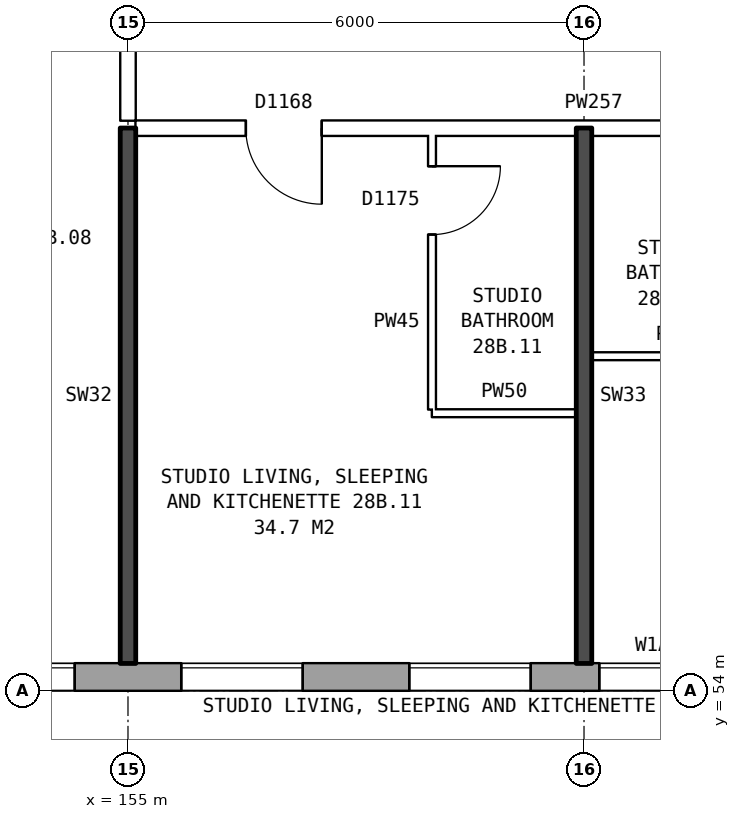
"""IFC4 building model, lengths in metres.
Left out: names, types, materials, properties, quantities, classifications, styles, units other than length and angle.
Written with IfcOpenShell. Run it as: python <this file> out.ifc"""

import sys

from ifc_helpers import new_model, si_unit, direction, frame, frame_2d, origin, place, context, subcontext, project, spatial, rectangle, extrude, element, fill, save


model = new_model("IFC4")
c1 = context("Model", 3, precision=1e-05, world=origin(), true_north=direction((0.0, 1.0)))
c2 = subcontext(c1, "Body", "Model", "MODEL_VIEW")
j1 = project(units=[si_unit("LENGTHUNIT", "METRE"), si_unit("PLANEANGLEUNIT", "RADIAN")], contexts=[c1])
p1 = place(None, origin())
s1 = spatial("IfcSite", under=j1, at=p1, CompositionType="ELEMENT")
p2 = place(p1, origin())
s2 = spatial("IfcBuilding", under=s1, at=p2, CompositionType="ELEMENT")
p3 = place(p2, frame((0.0, 0.0, 102.6)))
s3 = spatial("IfcBuildingStorey", under=s2, at=p3, CompositionType="ELEMENT", Elevation=102.6)
p4 = place(p3, frame((134.075, 54.18, 0.0), z_axis=(0.0, 0.0, 1.0), x_axis=(1.0, 0.0, 0.0)))
e1 = element("IfcWall", 1, at=p4, inside=s3, PredefinedType="STANDARD", context=c2, shape_type="SweptSolid", body=[
    extrude(rectangle(XDim=36.851, YDim=0.36, at=frame_2d((18.425, 0.0))), origin(), (0.0, 0.0, 1.0), 2.85),
])
p5 = place(p4, frame((0.625, 0.0, 0.8)))
e2 = element("IfcOpeningElement", 2, at=p5, cuts=e1, PredefinedType="OPENING", context=c2, shape_type="SweptSolid", body=[
    extrude(rectangle(XDim=1.6, YDim=1.8, at=frame_2d((0.8, 0.9))), frame((0.0, 0.19, 0.0), z_axis=(0.0, -1.0, 0.0), x_axis=(1.0, 0.0, 0.0)), (0.0, 0.0, 1.0), 0.38),
])
p6 = place(p4, frame((3.625, 0.0, 0.8)))
e3 = element("IfcOpeningElement", 3, at=p6, cuts=e1, PredefinedType="OPENING", context=c2, shape_type="SweptSolid", body=[
    extrude(rectangle(XDim=1.6, YDim=1.8, at=frame_2d((0.8, 0.9))), frame((0.0, 0.19, 0.0), z_axis=(0.0, -1.0, 0.0), x_axis=(1.0, 0.0, 0.0)), (0.0, 0.0, 1.0), 0.38),
])
p7 = place(p4, frame((7.475, 0.0, 0.8)))
e4 = element("IfcOpeningElement", 4, at=p7, cuts=e1, PredefinedType="OPENING", context=c2, shape_type="SweptSolid", body=[
    extrude(rectangle(XDim=1.2, YDim=1.2, at=frame_2d((0.6, 0.6))), frame((0.0, 0.19, 0.0), z_axis=(0.0, -1.0, 0.0), x_axis=(1.0, 0.0, 0.0)), (0.0, 0.0, 1.0), 0.38),
])
p8 = place(p4, frame((9.625, 0.0, 0.8)))
e5 = element("IfcOpeningElement", 5, at=p8, cuts=e1, PredefinedType="OPENING", context=c2, shape_type="SweptSolid", body=[
    extrude(rectangle(XDim=1.6, YDim=1.8, at=frame_2d((0.8, 0.9))), frame((0.0, 0.19, 0.0), z_axis=(0.0, -1.0, 0.0), x_axis=(1.0, 0.0, 0.0)), (0.0, 0.0, 1.0), 0.38),
])
p9 = place(p4, frame((12.625, 0.0, 0.8)))
e6 = element("IfcOpeningElement", 6, at=p9, cuts=e1, PredefinedType="OPENING", context=c2, shape_type="SweptSolid", body=[
    extrude(rectangle(XDim=1.6, YDim=1.8, at=frame_2d((0.8, 0.9))), frame((0.0, 0.19, 0.0), z_axis=(0.0, -1.0, 0.0), x_axis=(1.0, 0.0, 0.0)), (0.0, 0.0, 1.0), 0.38),
])
p10 = place(p4, frame((15.625, 0.0, 0.8)))
e7 = element("IfcOpeningElement", 7, at=p10, cuts=e1, PredefinedType="OPENING", context=c2, shape_type="SweptSolid", body=[
    extrude(rectangle(XDim=1.6, YDim=1.8, at=frame_2d((0.8, 0.9))), frame((0.0, 0.19, 0.0), z_axis=(0.0, -1.0, 0.0), x_axis=(1.0, 0.0, 0.0)), (0.0, 0.0, 1.0), 0.38),
])
p11 = place(p4, frame((18.625, 0.0, 0.8)))
e8 = element("IfcOpeningElement", 8, at=p11, cuts=e1, PredefinedType="OPENING", context=c2, shape_type="SweptSolid", body=[
    extrude(rectangle(XDim=1.6, YDim=1.8, at=frame_2d((0.8, 0.9))), frame((0.0, 0.19, 0.0), z_axis=(0.0, -1.0, 0.0), x_axis=(1.0, 0.0, 0.0)), (0.0, 0.0, 1.0), 0.38),
])
p12 = place(p4, frame((21.625, 0.0, 0.8)))
e9 = element("IfcOpeningElement", 9, at=p12, cuts=e1, PredefinedType="OPENING", context=c2, shape_type="SweptSolid", body=[
    extrude(rectangle(XDim=1.6, YDim=1.8, at=frame_2d((0.8, 0.9))), frame((0.0, 0.19, 0.0), z_axis=(0.0, -1.0, 0.0), x_axis=(1.0, 0.0, 0.0)), (0.0, 0.0, 1.0), 0.38),
])
p13 = place(p4, frame((24.625, 0.0, 0.8)))
e10 = element("IfcOpeningElement", 10, at=p13, cuts=e1, PredefinedType="OPENING", context=c2, shape_type="SweptSolid", body=[
    extrude(rectangle(XDim=1.6, YDim=1.8, at=frame_2d((0.8, 0.9))), frame((0.0, 0.19, 0.0), z_axis=(0.0, -1.0, 0.0), x_axis=(1.0, 0.0, 0.0)), (0.0, 0.0, 1.0), 0.38),
])
p14 = place(p4, frame((27.125, 0.0, 0.8)))
e11 = element("IfcOpeningElement", 11, at=p14, cuts=e1, PredefinedType="OPENING", context=c2, shape_type="SweptSolid", body=[
    extrude(rectangle(XDim=1.4, YDim=1.8, at=frame_2d((0.7, 0.9))), frame((0.0, 0.19, 0.0), z_axis=(0.0, -1.0, 0.0), x_axis=(1.0, 0.0, 0.0)), (0.0, 0.0, 1.0), 0.38),
])
p15 = place(p4, frame((28.825, 0.0, 0.8)))
e12 = element("IfcOpeningElement", 12, at=p15, cuts=e1, PredefinedType="OPENING", context=c2, shape_type="SweptSolid", body=[
    extrude(rectangle(XDim=0.8, YDim=0.9, at=frame_2d((0.4, 0.45))), frame((0.0, 0.19, 0.0), z_axis=(0.0, -1.0, 0.0), x_axis=(1.0, 0.0, 0.0)), (0.0, 0.0, 1.0), 0.38),
])
p16 = place(p4, frame((33.625, 0.0, 0.8)))
e13 = element("IfcOpeningElement", 13, at=p16, cuts=e1, PredefinedType="OPENING", context=c2, shape_type="SweptSolid", body=[
    extrude(rectangle(XDim=1.6, YDim=1.8, at=frame_2d((0.8, 0.9))), frame((0.0, 0.19, 0.0), z_axis=(0.0, -1.0, 0.0), x_axis=(1.0, 0.0, 0.0)), (0.0, 0.0, 1.0), 0.38),
])
p17 = place(p4, frame((30.825, 0.0, 1.7)))
e14 = element("IfcOpeningElement", 14, at=p17, cuts=e1, PredefinedType="OPENING", context=c2, shape_type="SweptSolid", body=[
    extrude(rectangle(XDim=0.8, YDim=0.9, at=frame_2d((0.4, 0.45))), frame((0.0, 0.19, 0.0), z_axis=(0.0, -1.0, 0.0), x_axis=(1.0, 0.0, 0.0)), (0.0, 0.0, 1.0), 0.38),
])
p18 = place(p4, frame((31.925, 0.0, 0.8)))
e15 = element("IfcOpeningElement", 15, at=p18, cuts=e1, PredefinedType="OPENING", context=c2, shape_type="SweptSolid", body=[
    extrude(rectangle(XDim=0.8, YDim=1.8, at=frame_2d((0.4, 0.9))), frame((0.0, 0.19, 0.0), z_axis=(0.0, -1.0, 0.0), x_axis=(1.0, 0.0, 0.0)), (0.0, 0.0, 1.0), 0.38),
])
p19 = place(p3, frame((159.0, 57.65, 0.0), z_axis=(0.0, 0.0, 1.0), x_axis=(1.0, 0.0, 0.0)))
e16 = element("IfcWall", 16, at=p19, inside=s3, PredefinedType="PARTITIONING", context=c2, shape_type="SweptSolid", body=[
    extrude(rectangle(XDim=1.9, YDim=0.1, at=frame_2d((0.95, 0.0))), origin(), (0.0, 0.0, 1.0), 2.85),
])
p20 = place(p3, frame((161.1, 58.4, 0.0), z_axis=(0.0, 0.0, 1.0), x_axis=(1.0, 0.0, 0.0)))
e17 = element("IfcWall", 17, at=p20, inside=s3, PredefinedType="PARTITIONING", context=c2, shape_type="SweptSolid", body=[
    extrude(rectangle(XDim=2.3, YDim=0.1, at=frame_2d((1.15, 0.0))), origin(), (0.0, 0.0, 1.0), 2.85),
])
p21 = place(p3, frame((155.1, 61.4, 0.0), z_axis=(0.0, 0.0, 1.0), x_axis=(1.0, 0.0, 0.0)))
e18 = element("IfcWall", 18, at=p21, inside=s3, PredefinedType="PARTITIONING", context=c2, shape_type="SweptSolid", body=[
    extrude(rectangle(XDim=18.54, YDim=0.2, at=frame_2d((9.27, 0.0))), origin(), (0.0, 0.0, 1.0), 2.85),
])
p22 = place(p21, frame((1.45, 0.0, 0.0)))
e19 = element("IfcOpeningElement", 19, at=p22, cuts=e18, PredefinedType="OPENING", context=c2, shape_type="SweptSolid", body=[
    extrude(rectangle(XDim=1.0, YDim=2.1, at=frame_2d((0.5, 1.05))), frame((0.0, 0.11, 0.0), z_axis=(0.0, -1.0, 0.0), x_axis=(1.0, 0.0, 0.0)), (0.0, 0.0, 1.0), 0.22),
])
p23 = place(p21, frame((9.6, 0.0, 0.0)))
e20 = element("IfcOpeningElement", 20, at=p23, cuts=e18, PredefinedType="OPENING", context=c2, shape_type="SweptSolid", body=[
    extrude(rectangle(XDim=1.0, YDim=2.1, at=frame_2d((0.5, 1.05))), frame((0.0, 0.11, 0.0), z_axis=(0.0, -1.0, 0.0), x_axis=(1.0, 0.0, 0.0)), (0.0, 0.0, 1.0), 0.22),
])
p24 = place(p21, frame((15.92, 0.0, 0.0)))
e21 = element("IfcOpeningElement", 21, at=p24, cuts=e18, PredefinedType="OPENING", context=c2, shape_type="SweptSolid", body=[
    extrude(rectangle(XDim=1.0, YDim=2.1, at=frame_2d((0.5, 1.05))), frame((0.0, 0.11, 0.0), z_axis=(0.0, -1.0, 0.0), x_axis=(1.0, 0.0, 0.0)), (0.0, 0.0, 1.0), 0.22),
])
p25 = place(p3, frame((155.0, 54.36, 0.0), z_axis=(0.0, 0.0, 1.0), x_axis=(0.0, 1.0, 0.0)))
e22 = element("IfcWall", 22, at=p25, inside=s3, PredefinedType="SOLIDWALL", context=c2, shape_type="SweptSolid", body=[
    extrude(rectangle(XDim=7.04, YDim=0.2, at=frame_2d((3.52, 0.0))), origin(), (0.0, 0.0, 1.0), 2.85),
])
p26 = place(p3, frame((155.0, 61.5, 0.0), z_axis=(0.0, 0.0, 1.0), x_axis=(0.0, 1.0, 0.0)))
e23 = element("IfcWall", 23, at=p26, inside=s3, PredefinedType="PARTITIONING", context=c2, shape_type="SweptSolid", body=[
    extrude(rectangle(XDim=2.2, YDim=0.2, at=frame_2d((1.1, 0.0))), origin(), (0.0, 0.0, 1.0), 2.85),
])
p27 = place(p3, frame((159.0, 57.7, 0.0), z_axis=(0.0, 0.0, 1.0), x_axis=(0.0, 1.0, 0.0)))
e24 = element("IfcWall", 24, at=p27, inside=s3, PredefinedType="PARTITIONING", context=c2, shape_type="SweptSolid", body=[
    extrude(rectangle(XDim=3.6, YDim=0.1, at=frame_2d((1.8, 0.0))), origin(), (0.0, 0.0, 1.0), 2.85),
])
p28 = place(p27, frame((2.3, 0.0, 0.0)))
e25 = element("IfcOpeningElement", 25, at=p28, cuts=e24, PredefinedType="OPENING", context=c2, shape_type="SweptSolid", body=[
    extrude(rectangle(XDim=0.9, YDim=2.1, at=frame_2d((0.45, 1.05))), frame((0.0, 0.06, 0.0), z_axis=(0.0, -1.0, 0.0), x_axis=(1.0, 0.0, 0.0)), (0.0, 0.0, 1.0), 0.12),
])
p29 = place(p3, frame((161.0, 54.36, 0.0), z_axis=(0.0, 0.0, 1.0), x_axis=(0.0, 1.0, 0.0)))
e26 = element("IfcWall", 26, at=p29, inside=s3, PredefinedType="SOLIDWALL", context=c2, shape_type="SweptSolid", body=[
    extrude(rectangle(XDim=7.04, YDim=0.2, at=frame_2d((3.52, 0.0))), origin(), (0.0, 0.0, 1.0), 2.85),
])
p30 = place(p11, origin())
e27 = element("IfcWindow", 27, at=p30, inside=s3, PartitioningType="SINGLE_PANEL", PredefinedType="WINDOW", context=c2, shape_type="SweptSolid", body=[
    extrude(rectangle(XDim=1.6, YDim=1.8, at=frame_2d((0.8, 0.9))), frame((0.0, 0.15, 0.0), z_axis=(0.0, -1.0, 0.0), x_axis=(1.0, 0.0, 0.0)), (0.0, 0.0, 1.0), 0.06),
])
fill(e8, e27)
p31 = place(p12, origin())
e28 = element("IfcWindow", 28, at=p31, inside=s3, PartitioningType="SINGLE_PANEL", PredefinedType="WINDOW", context=c2, shape_type="SweptSolid", body=[
    extrude(rectangle(XDim=1.6, YDim=1.8, at=frame_2d((0.8, 0.9))), frame((0.0, 0.15, 0.0), z_axis=(0.0, -1.0, 0.0), x_axis=(1.0, 0.0, 0.0)), (0.0, 0.0, 1.0), 0.06),
])
fill(e9, e28)
p32 = place(p13, origin())
e29 = element("IfcWindow", 29, at=p32, inside=s3, PartitioningType="SINGLE_PANEL", PredefinedType="WINDOW", context=c2, shape_type="SweptSolid", body=[
    extrude(rectangle(XDim=1.6, YDim=1.8, at=frame_2d((0.8, 0.9))), frame((0.0, 0.15, 0.0), z_axis=(0.0, -1.0, 0.0), x_axis=(1.0, 0.0, 0.0)), (0.0, 0.0, 1.0), 0.06),
])
fill(e10, e29)
p33 = place(p14, origin())
e30 = element("IfcWindow", 30, at=p33, inside=s3, PartitioningType="SINGLE_PANEL", PredefinedType="WINDOW", context=c2, shape_type="SweptSolid", body=[
    extrude(rectangle(XDim=1.4, YDim=1.8, at=frame_2d((0.7, 0.9))), frame((0.0, 0.15, 0.0), z_axis=(0.0, -1.0, 0.0), x_axis=(1.0, 0.0, 0.0)), (0.0, 0.0, 1.0), 0.06),
])
fill(e11, e30)
p34 = place(p22, frame((1.0, 0.0, 0.0), z_axis=(0.0, 0.0, 1.0), x_axis=(-1.0, 0.0, 0.0)))
e31 = element("IfcDoor", 31, at=p34, inside=s3, OperationType="SINGLE_SWING_LEFT", PredefinedType="DOOR", context=c2, shape_type="SweptSolid", body=[
    extrude(rectangle(XDim=1.0, YDim=2.1, at=frame_2d((0.5, 1.05))), frame((0.0, 0.025, 0.0), z_axis=(0.0, -1.0, 0.0), x_axis=(1.0, 0.0, 0.0)), (0.0, 0.0, 1.0), 0.05),
])
fill(e19, e31)
p35 = place(p28, frame((0.9, 0.0, 0.0), z_axis=(0.0, 0.0, 1.0), x_axis=(-1.0, 0.0, 0.0)))
e32 = element("IfcDoor", 32, at=p35, inside=s3, OperationType="SINGLE_SWING_LEFT", PredefinedType="DOOR", context=c2, shape_type="SweptSolid", body=[
    extrude(rectangle(XDim=0.9, YDim=2.1, at=frame_2d((0.45, 1.05))), frame((0.0, 0.025, 0.0), z_axis=(0.0, -1.0, 0.0), x_axis=(1.0, 0.0, 0.0)), (0.0, 0.0, 1.0), 0.05),
])
fill(e25, e32)
save(model, sys.argv[1])
